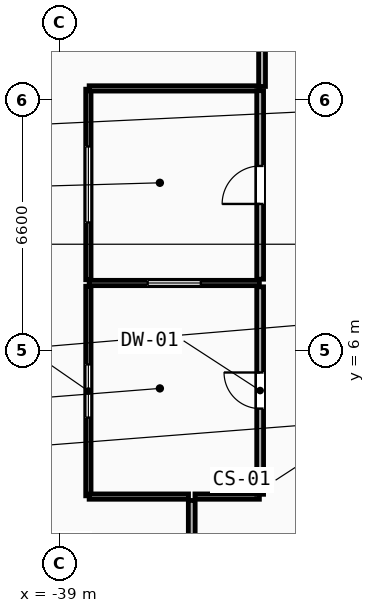
"""IFC4 building model, lengths in metres.
Left out: names, types, materials, properties, quantities, classifications, styles, units other than length and angle.
Written with IfcOpenShell. Run it as: python <this file> out.ifc"""

import sys

from ifc_helpers import new_model, si_unit, direction, frame, frame_2d, origin, place, context, subcontext, project, spatial, rectangle, extrude, element, fill, save


model = new_model("IFC4")
c1 = context("Model", 3, precision=1e-05, world=origin(), true_north=direction((0.0, 1.0)))
c2 = subcontext(c1, "Body", "Model", "MODEL_VIEW")
j1 = project(units=[si_unit("LENGTHUNIT", "METRE"), si_unit("PLANEANGLEUNIT", "RADIAN")], contexts=[c1])
p1 = place(None, origin())
s1 = spatial("IfcSite", under=j1, at=p1, CompositionType="ELEMENT")
p2 = place(p1, origin())
s2 = spatial("IfcBuilding", under=s1, at=p2, CompositionType="ELEMENT")
p3 = place(p2, frame((0.0, 0.0, 16.0)))
s3 = spatial("IfcBuildingStorey", under=s2, at=p3, CompositionType="ELEMENT", Elevation=16.0)
p4 = place(p3, frame((-38.24, 2.18, 0.0), z_axis=(0.0, 0.0, 1.0), x_axis=(0.0, 1.0, 0.0)))
e1 = element("IfcWall", 1, at=p4, inside=s3, PredefinedType="PARTITIONING", context=c2, shape_type="SweptSolid", body=[
    extrude(rectangle(XDim=5.515, YDim=0.14, at=frame_2d((2.758, 0.0))), origin(), (0.0, 0.0, 1.0), 3.65),
])
p5 = place(p4, frame((2.058, 0.0, 1.05)))
e2 = element("IfcOpeningElement", 2, at=p5, cuts=e1, PredefinedType="OPENING", context=c2, shape_type="SweptSolid", body=[
    extrude(rectangle(XDim=1.4, YDim=1.5, at=frame_2d((0.7, 0.75))), frame((0.0, 0.08, 0.0), z_axis=(0.0, -1.0, 0.0), x_axis=(1.0, 0.0, 0.0)), (0.0, 0.0, 1.0), 0.16),
])
p6 = place(p3, frame((-38.24, 7.865, 0.0), z_axis=(0.0, 0.0, 1.0), x_axis=(0.0, 1.0, 0.0)))
e3 = element("IfcWall", 3, at=p6, inside=s3, PredefinedType="PARTITIONING", context=c2, shape_type="SweptSolid", body=[
    extrude(rectangle(XDim=5.015, YDim=0.14, at=frame_2d((2.507, 0.0))), origin(), (0.0, 0.0, 1.0), 3.65),
])
p7 = place(p6, frame((1.508, 0.0, 1.05)))
e4 = element("IfcOpeningElement", 4, at=p7, cuts=e3, PredefinedType="OPENING", context=c2, shape_type="SweptSolid", body=[
    extrude(rectangle(XDim=2.0, YDim=1.5, at=frame_2d((1.0, 0.75))), frame((0.0, 0.08, 0.0), z_axis=(0.0, -1.0, 0.0), x_axis=(1.0, 0.0, 0.0)), (0.0, 0.0, 1.0), 0.16),
])
p8 = place(p3, frame((-38.22, 2.16, 0.0), z_axis=(0.0, 0.0, 1.0), x_axis=(1.0, 0.0, 0.0)))
e5 = element("IfcWall", 5, at=p8, inside=s3, PredefinedType="PARTITIONING", context=c2, shape_type="SweptSolid", body=[
    extrude(rectangle(XDim=2.615, YDim=0.14, at=frame_2d((1.308, 0.0))), origin(), (0.0, 0.0, 1.0), 3.65),
])
p9 = place(p3, frame((-35.435, 2.16, 0.0), z_axis=(0.0, 0.0, 1.0), x_axis=(1.0, 0.0, 0.0)))
e6 = element("IfcWall", 6, at=p9, inside=s3, PredefinedType="PARTITIONING", context=c2, shape_type="SweptSolid", body=[
    extrude(rectangle(XDim=1.695, YDim=0.14, at=frame_2d((0.848, 0.0))), origin(), (0.0, 0.0, 1.0), 3.65),
])
p10 = place(p3, frame((-38.22, 7.78, 0.0), z_axis=(0.0, 0.0, 1.0), x_axis=(1.0, 0.0, 0.0)))
e7 = element("IfcWall", 7, at=p10, inside=s3, PredefinedType="PARTITIONING", context=c2, shape_type="SweptSolid", body=[
    extrude(rectangle(XDim=4.48, YDim=0.14, at=frame_2d((2.24, 0.0))), origin(), (0.0, 0.0, 1.0), 3.65),
])
p11 = place(p10, frame((1.54, 0.0, 1.05)))
e8 = element("IfcOpeningElement", 8, at=p11, cuts=e7, PredefinedType="OPENING", context=c2, shape_type="SweptSolid", body=[
    extrude(rectangle(XDim=1.4, YDim=1.5, at=frame_2d((0.7, 0.75))), frame((0.0, 0.08, 0.0), z_axis=(0.0, -1.0, 0.0), x_axis=(1.0, 0.0, 0.0)), (0.0, 0.0, 1.0), 0.16),
])
p12 = place(p3, frame((-38.22, 12.9, 0.0), z_axis=(0.0, 0.0, 1.0), x_axis=(1.0, 0.0, 0.0)))
e9 = element("IfcWall", 9, at=p12, inside=s3, PredefinedType="PARTITIONING", context=c2, shape_type="SweptSolid", body=[
    extrude(rectangle(XDim=4.48, YDim=0.14, at=frame_2d((2.24, 0.0))), origin(), (0.0, 0.0, 1.0), 3.65),
])
p13 = place(p3, frame((-33.72, 2.22, 0.0), z_axis=(0.0, 0.0, 1.0), x_axis=(0.0, 1.0, 0.0)))
e10 = element("IfcWall", 10, at=p13, inside=s3, PredefinedType="PARTITIONING", context=c2, shape_type="SweptSolid", body=[
    extrude(rectangle(XDim=5.46, YDim=0.18, at=frame_2d((2.73, 0.0))), origin(), (0.0, 0.0, 1.0), 3.65),
])
p14 = place(p13, frame((2.255, 0.0, 0.0)))
e11 = element("IfcOpeningElement", 11, at=p14, cuts=e10, PredefinedType="OPENING", context=c2, shape_type="SweptSolid", body=[
    extrude(rectangle(XDim=0.95, YDim=2.1, at=frame_2d((0.475, 1.05))), frame((0.0, 0.1, 0.0), z_axis=(0.0, -1.0, 0.0), x_axis=(1.0, 0.0, 0.0)), (0.0, 0.0, 1.0), 0.2),
])
p15 = place(p3, frame((-33.72, 7.88, 0.0), z_axis=(0.0, 0.0, 1.0), x_axis=(0.0, 1.0, 0.0)))
e12 = element("IfcWall", 12, at=p15, inside=s3, PredefinedType="PARTITIONING", context=c2, shape_type="SweptSolid", body=[
    extrude(rectangle(XDim=4.96, YDim=0.18, at=frame_2d((2.48, 0.0))), origin(), (0.0, 0.0, 1.0), 3.65),
])
p16 = place(p15, frame((1.98, 0.0, 0.0)))
e13 = element("IfcOpeningElement", 13, at=p16, cuts=e12, PredefinedType="OPENING", context=c2, shape_type="SweptSolid", body=[
    extrude(rectangle(XDim=1.0, YDim=2.15, at=frame_2d((0.5, 1.075))), frame((0.0, 0.1, 0.0), z_axis=(0.0, -1.0, 0.0), x_axis=(1.0, 0.0, 0.0)), (0.0, 0.0, 1.0), 0.2),
])
p17 = place(p3, frame((-33.67, 17.428, 0.0), z_axis=(0.0, 0.0, 1.0), x_axis=(0.0, -1.0, 0.0)))
e14 = element("IfcWall", 14, at=p17, inside=s3, PredefinedType="PARTITIONING", context=c2, shape_type="SweptSolid", body=[
    extrude(rectangle(XDim=4.477, YDim=0.18, at=frame_2d((2.239, 0.0))), origin(), (0.0, 0.0, 1.0), 3.65),
])
p18 = place(p17, frame((1.438, 0.0, 0.0)))
e15 = element("IfcOpeningElement", 15, at=p18, cuts=e14, PredefinedType="OPENING", context=c2, shape_type="SweptSolid", body=[
    extrude(rectangle(XDim=1.6, YDim=2.2, at=frame_2d((0.8, 1.1))), frame((0.0, 0.1, 0.0), z_axis=(0.0, -1.0, 0.0), x_axis=(1.0, 0.0, 0.0)), (0.0, 0.0, 1.0), 0.2),
])
p19 = place(p3, frame((-35.52, 2.059, 0.0), z_axis=(0.0, 0.0, 1.0), x_axis=(0.0, -1.0, 0.0)))
e16 = element("IfcWall", 16, at=p19, inside=s3, PredefinedType="PARTITIONING", context=c2, shape_type="SweptSolid", body=[
    extrude(rectangle(XDim=4.117, YDim=0.18, at=frame_2d((2.059, 0.0))), origin(), (0.0, 0.0, 1.0), 3.65),
])
p20 = place(p14, origin())
e17 = element("IfcDoor", 17, at=p20, inside=s3, OperationType="SINGLE_SWING_RIGHT", PredefinedType="DOOR", context=c2, shape_type="SweptSolid", body=[
    extrude(rectangle(XDim=0.95, YDim=2.1, at=frame_2d((0.475, 1.05))), frame((0.0, 0.025, 0.0), z_axis=(0.0, -1.0, 0.0), x_axis=(1.0, 0.0, 0.0)), (0.0, 0.0, 1.0), 0.05),
])
fill(e11, e17)
p21 = place(p16, origin())
e18 = element("IfcDoor", 18, at=p21, inside=s3, OperationType="SINGLE_SWING_LEFT", PredefinedType="DOOR", context=c2, shape_type="SweptSolid", body=[
    extrude(rectangle(XDim=1.0, YDim=2.15, at=frame_2d((0.5, 1.075))), frame((0.0, 0.025, 0.0), z_axis=(0.0, -1.0, 0.0), x_axis=(1.0, 0.0, 0.0)), (0.0, 0.0, 1.0), 0.05),
])
fill(e13, e18)
p22 = place(p5, origin())
e19 = element("IfcWindow", 19, at=p22, inside=s3, PartitioningType="SINGLE_PANEL", PredefinedType="WINDOW", context=c2, shape_type="SweptSolid", body=[
    extrude(rectangle(XDim=1.4, YDim=1.5, at=frame_2d((0.7, 0.75))), frame((0.0, 0.03, 0.0), z_axis=(0.0, -1.0, 0.0), x_axis=(1.0, 0.0, 0.0)), (0.0, 0.0, 1.0), 0.06),
])
fill(e2, e19)
p23 = place(p7, origin())
e20 = element("IfcWindow", 20, at=p23, inside=s3, PartitioningType="SINGLE_PANEL", PredefinedType="WINDOW", context=c2, shape_type="SweptSolid", body=[
    extrude(rectangle(XDim=2.0, YDim=1.5, at=frame_2d((1.0, 0.75))), frame((0.0, 0.03, 0.0), z_axis=(0.0, -1.0, 0.0), x_axis=(1.0, 0.0, 0.0)), (0.0, 0.0, 1.0), 0.06),
])
fill(e4, e20)
p24 = place(p11, origin())
e21 = element("IfcWindow", 21, at=p24, inside=s3, PartitioningType="SINGLE_PANEL", PredefinedType="WINDOW", context=c2, shape_type="SweptSolid", body=[
    extrude(rectangle(XDim=1.4, YDim=1.5, at=frame_2d((0.7, 0.75))), frame((0.0, 0.03, 0.0), z_axis=(0.0, -1.0, 0.0), x_axis=(1.0, 0.0, 0.0)), (0.0, 0.0, 1.0), 0.06),
])
fill(e8, e21)
save(model, sys.argv[1])
